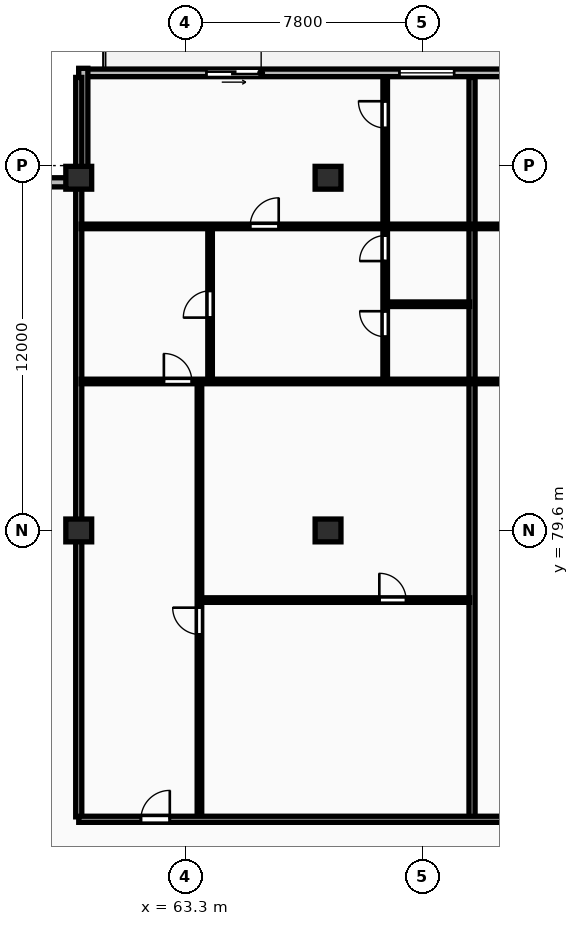
"""IFC4 building model, lengths in metres.
Left out: names, types, materials, properties, quantities, classifications, styles, units other than length and angle.
Written with IfcOpenShell. Run it as: python <this file> out.ifc"""

import sys

from ifc_helpers import new_model, si_unit, direction, frame, frame_2d, origin, origin_2d, place, context, subcontext, project, spatial, rectangle, extrude, element, fill, save


model = new_model("IFC4")
c1 = context("Model", 3, precision=1e-05, world=origin(), true_north=direction((0.0, 1.0)))
c2 = subcontext(c1, "Body", "Model", "MODEL_VIEW")
j1 = project(units=[si_unit("LENGTHUNIT", "METRE"), si_unit("PLANEANGLEUNIT", "RADIAN")], contexts=[c1])
p1 = place(None, origin())
s1 = spatial("IfcSite", under=j1, at=p1, CompositionType="ELEMENT")
p2 = place(p1, origin())
s2 = spatial("IfcBuilding", under=s1, at=p2, CompositionType="ELEMENT")
p3 = place(p2, frame((0.0, 0.0, 207.6)))
s3 = spatial("IfcBuildingStorey", under=s2, at=p3, CompositionType="ELEMENT", Elevation=207.6)
for number, where, z_axis, x_axis in (
    (1, (59.8, 79.6, 0.0), (0.0, 0.0, 1.0), (1.0, 0.0, 0.0)),
    (2, (59.8, 91.2, 0.0), (0.0, 0.0, 1.0), (1.0, 0.0, 0.0)),
    (3, (68.0, 79.6, 0.0), (0.0, 0.0, 1.0), (1.0, 0.0, 0.0)),
    (4, (68.0, 91.2, 0.0), (0.0, 0.0, 1.0), (1.0, 0.0, 0.0)),
):
    element("IfcColumn", number, at=place(p3, frame(where, z_axis=z_axis, x_axis=x_axis)), inside=s3, PredefinedType="COLUMN", context=c2, shape_type="SweptSolid", body=[
        extrude(rectangle(XDim=0.85, YDim=0.75, at=origin_2d()), origin(), (0.0, 0.0, 1.0), 3.25),
    ])
p4 = place(p3, frame((128.4, 94.65, 0.0), z_axis=(0.0, 0.0, 1.0), x_axis=(-1.0, 0.0, 0.0)))
e5 = element("IfcWall", 5, at=p4, inside=s3, PredefinedType="STANDARD", context=c2, shape_type="SweptSolid", body=[
    extrude(rectangle(XDim=68.6, YDim=0.25, at=frame_2d((34.3, 0.0))), origin(), (0.0, 0.0, 1.0), 2.97),
])
p5 = place(p4, frame((62.6, 0.0, 0.0)))
e6 = element("IfcOpeningElement", 6, at=p5, cuts=e5, PredefinedType="OPENING", context=c2, shape_type="SweptSolid", body=[
    extrude(rectangle(XDim=1.8, YDim=2.2, at=frame_2d((0.9, 1.1))), frame((0.0, 0.135, 0.0), z_axis=(0.0, -1.0, 0.0), x_axis=(1.0, 0.0, 0.0)), (0.0, 0.0, 1.0), 0.27),
])
p6 = place(p4, frame((56.252, 0.0, 0.85)))
e7 = element("IfcOpeningElement", 7, at=p6, cuts=e5, PredefinedType="OPENING", context=c2, shape_type="SweptSolid", body=[
    extrude(rectangle(XDim=1.8, YDim=1.8, at=frame_2d((0.9, 0.9))), frame((0.0, 0.135, 0.0), z_axis=(0.0, -1.0, 0.0), x_axis=(1.0, 0.0, 0.0)), (0.0, 0.0, 1.0), 0.27),
])
p7 = place(p4, frame((49.882, 0.0, 0.0)))
e8 = element("IfcOpeningElement", 8, at=p7, cuts=e5, PredefinedType="OPENING", context=c2, shape_type="SweptSolid", body=[
    extrude(rectangle(XDim=1.8, YDim=2.2, at=frame_2d((0.9, 1.1))), frame((0.0, 0.135, 0.0), z_axis=(0.0, -1.0, 0.0), x_axis=(1.0, 0.0, 0.0)), (0.0, 0.0, 1.0), 0.27),
])
p8 = place(p4, frame((43.47, 0.0, 0.85)))
e9 = element("IfcOpeningElement", 9, at=p8, cuts=e5, PredefinedType="OPENING", context=c2, shape_type="SweptSolid", body=[
    extrude(rectangle(XDim=1.8, YDim=1.8, at=frame_2d((0.9, 0.9))), frame((0.0, 0.135, 0.0), z_axis=(0.0, -1.0, 0.0), x_axis=(1.0, 0.0, 0.0)), (0.0, 0.0, 1.0), 0.27),
])
p9 = place(p4, frame((36.75, 0.0, 0.0)))
e10 = element("IfcOpeningElement", 10, at=p9, cuts=e5, PredefinedType="OPENING", context=c2, shape_type="SweptSolid", body=[
    extrude(rectangle(XDim=1.8, YDim=2.2, at=frame_2d((0.9, 1.1))), frame((0.0, 0.135, 0.0), z_axis=(0.0, -1.0, 0.0), x_axis=(1.0, 0.0, 0.0)), (0.0, 0.0, 1.0), 0.27),
])
p10 = place(p4, frame((30.402, 0.0, 0.85)))
e11 = element("IfcOpeningElement", 11, at=p10, cuts=e5, PredefinedType="OPENING", context=c2, shape_type="SweptSolid", body=[
    extrude(rectangle(XDim=1.8, YDim=1.8, at=frame_2d((0.9, 0.9))), frame((0.0, 0.135, 0.0), z_axis=(0.0, -1.0, 0.0), x_axis=(1.0, 0.0, 0.0)), (0.0, 0.0, 1.0), 0.27),
])
p11 = place(p4, frame((23.882, 0.0, 0.0)))
e12 = element("IfcOpeningElement", 12, at=p11, cuts=e5, PredefinedType="OPENING", context=c2, shape_type="SweptSolid", body=[
    extrude(rectangle(XDim=1.8, YDim=2.2, at=frame_2d((0.9, 1.1))), frame((0.0, 0.135, 0.0), z_axis=(0.0, -1.0, 0.0), x_axis=(1.0, 0.0, 0.0)), (0.0, 0.0, 1.0), 0.27),
])
p12 = place(p4, frame((17.47, 0.0, 0.85)))
e13 = element("IfcOpeningElement", 13, at=p12, cuts=e5, PredefinedType="OPENING", context=c2, shape_type="SweptSolid", body=[
    extrude(rectangle(XDim=1.8, YDim=1.8, at=frame_2d((0.9, 0.9))), frame((0.0, 0.135, 0.0), z_axis=(0.0, -1.0, 0.0), x_axis=(1.0, 0.0, 0.0)), (0.0, 0.0, 1.0), 0.27),
])
p13 = place(p4, frame((9.48, 0.0, 0.85)))
e14 = element("IfcOpeningElement", 14, at=p13, cuts=e5, PredefinedType="OPENING", context=c2, shape_type="SweptSolid", body=[
    extrude(rectangle(XDim=1.8, YDim=1.8, at=frame_2d((0.9, 0.9))), frame((0.0, 0.135, 0.0), z_axis=(0.0, -1.0, 0.0), x_axis=(1.0, 0.0, 0.0)), (0.0, 0.0, 1.0), 0.27),
])
p14 = place(p4, frame((5.23, 0.0, 0.85)))
e15 = element("IfcOpeningElement", 15, at=p14, cuts=e5, PredefinedType="OPENING", context=c2, shape_type="SweptSolid", body=[
    extrude(rectangle(XDim=2.4, YDim=1.9, at=frame_2d((1.2, 0.95))), frame((0.0, 0.135, 0.0), z_axis=(0.0, -1.0, 0.0), x_axis=(1.0, 0.0, 0.0)), (0.0, 0.0, 1.0), 0.27),
])
p15 = place(p4, frame((13.455, 0.0, 0.0)))
e16 = element("IfcOpeningElement", 16, at=p15, cuts=e5, PredefinedType="OPENING", context=c2, shape_type="SweptSolid", body=[
    extrude(rectangle(XDim=1.8, YDim=2.2, at=frame_2d((0.9, 1.1))), frame((0.0, 0.135, 0.0), z_axis=(0.0, -1.0, 0.0), x_axis=(1.0, 0.0, 0.0)), (0.0, 0.0, 1.0), 0.27),
])
p16 = place(p4, frame((1.025, 0.0, 0.85)))
e17 = element("IfcOpeningElement", 17, at=p16, cuts=e5, PredefinedType="OPENING", context=c2, shape_type="SweptSolid", body=[
    extrude(rectangle(XDim=2.4, YDim=1.9, at=frame_2d((1.2, 0.95))), frame((0.0, 0.135, 0.0), z_axis=(0.0, -1.0, 0.0), x_axis=(1.0, 0.0, 0.0)), (0.0, 0.0, 1.0), 0.27),
])
for number, where, z_axis, x_axis in (
    (18, (59.95, 94.8, 0.0), (0.0, 0.0, 1.0), (0.0, -1.0, 0.0)),
    (19, (59.8, 91.05, 0.0), (0.0, 0.0, 1.0), (-1.0, 0.0, 0.0)),
):
    element("IfcWall", number, at=place(p3, frame(where, z_axis=z_axis, x_axis=x_axis)), inside=s3, PredefinedType="STANDARD", context=c2, shape_type="SweptSolid", body=[
        extrude(rectangle(XDim=3.6, YDim=0.3, at=frame_2d((1.8, 0.0))), origin(), (0.0, 0.0, 1.0), 2.97),
    ])
p17 = place(p3, frame((59.8, 70.18, 0.0), z_axis=(0.0, 0.0, 1.0), x_axis=(0.0, 1.0, 0.0)))
e20 = element("IfcWall", 20, at=p17, inside=s3, PredefinedType="PARTITIONING", context=c2, shape_type="SweptSolid", body=[
    extrude(rectangle(XDim=24.32, YDim=0.2, at=frame_2d((12.16, 0.0))), origin(), (0.0, 0.0, 1.0), 2.277),
])
p18 = place(p3, frame((72.736, 70.18, 0.0), z_axis=(0.0, 0.0, 1.0), x_axis=(0.0, 1.0, 0.0)))
e21 = element("IfcWall", 21, at=p18, inside=s3, PredefinedType="PARTITIONING", context=c2, shape_type="SweptSolid", body=[
    extrude(rectangle(XDim=24.32, YDim=0.2, at=frame_2d((12.16, 0.0))), origin(), (0.0, 0.0, 1.0), 2.97),
])
p19 = place(p3, frame((63.83, 77.31, 0.0), z_axis=(0.0, 0.0, 1.0), x_axis=(1.0, 0.0, 0.0)))
e22 = element("IfcWall", 22, at=p19, inside=s3, PredefinedType="PARTITIONING", context=c2, shape_type="SweptSolid", body=[
    extrude(rectangle(XDim=8.826, YDim=0.15, at=frame_2d((4.413, 0.0))), origin(), (0.0, 0.0, 1.0), 2.97),
])
p20 = place(p19, frame((5.857, 0.0, 0.0)))
e23 = element("IfcOpeningElement", 23, at=p20, cuts=e22, PredefinedType="OPENING", context=c2, shape_type="SweptSolid", body=[
    extrude(rectangle(XDim=0.88, YDim=2.06, at=frame_2d((0.44, 1.03))), frame((0.0, 0.085, 0.0), z_axis=(0.0, -1.0, 0.0), x_axis=(1.0, 0.0, 0.0)), (0.0, 0.0, 1.0), 0.17),
])
p21 = place(p3, frame((63.77, 70.16, 0.0), z_axis=(0.0, 0.0, 1.0), x_axis=(0.0, 1.0, 0.0)))
e24 = element("IfcWall", 24, at=p21, inside=s3, PredefinedType="PARTITIONING", context=c2, shape_type="SweptSolid", body=[
    extrude(rectangle(XDim=14.3, YDim=0.15, at=frame_2d((7.15, 0.0))), origin(), (0.0, 0.0, 1.0), 2.97),
])
p22 = place(p21, frame((6.02, 0.0, 0.0)))
e25 = element("IfcOpeningElement", 25, at=p22, cuts=e24, PredefinedType="OPENING", context=c2, shape_type="SweptSolid", body=[
    extrude(rectangle(XDim=0.88, YDim=2.06, at=frame_2d((0.44, 1.03))), frame((0.0, 0.085, 0.0), z_axis=(0.0, -1.0, 0.0), x_axis=(1.0, 0.0, 0.0)), (0.0, 0.0, 1.0), 0.17),
])
p23 = place(p3, frame((64.12, 84.54, 0.0), z_axis=(0.0, 0.0, 1.0), x_axis=(0.0, 1.0, 0.0)))
e26 = element("IfcWall", 26, at=p23, inside=s3, PredefinedType="PARTITIONING", context=c2, shape_type="SweptSolid", body=[
    extrude(rectangle(XDim=5.0, YDim=0.15, at=frame_2d((2.5, 0.0))), origin(), (0.0, 0.0, 1.0), 2.97),
])
p24 = place(p23, frame((2.06, 0.0, 0.0)))
e27 = element("IfcOpeningElement", 27, at=p24, cuts=e26, PredefinedType="OPENING", context=c2, shape_type="SweptSolid", body=[
    extrude(rectangle(XDim=0.88, YDim=2.06, at=frame_2d((0.44, 1.03))), frame((0.0, 0.085, 0.0), z_axis=(0.0, -1.0, 0.0), x_axis=(1.0, 0.0, 0.0)), (0.0, 0.0, 1.0), 0.17),
])
p25 = place(p3, frame((69.94, 87.04, 0.0), z_axis=(0.0, 0.0, 1.0), x_axis=(1.0, 0.0, 0.0)))
e28 = element("IfcWall", 28, at=p25, inside=s3, PredefinedType="PARTITIONING", context=c2, shape_type="SweptSolid", body=[
    extrude(rectangle(XDim=2.716, YDim=0.15, at=frame_2d((1.358, 0.0))), origin(), (0.0, 0.0, 1.0), 2.97),
])
p26 = place(p3, frame((69.88, 84.54, 0.0), z_axis=(0.0, 0.0, 1.0), x_axis=(0.0, 1.0, 0.0)))
e29 = element("IfcWall", 29, at=p26, inside=s3, PredefinedType="PARTITIONING", context=c2, shape_type="SweptSolid", body=[
    extrude(rectangle(XDim=9.96, YDim=0.15, at=frame_2d((4.98, 0.0))), origin(), (0.0, 0.0, 1.0), 2.97),
])
p27 = place(p26, frame((1.43, 0.0, 0.0)))
e30 = element("IfcOpeningElement", 30, at=p27, cuts=e29, PredefinedType="OPENING", context=c2, shape_type="SweptSolid", body=[
    extrude(rectangle(XDim=0.84, YDim=2.04, at=frame_2d((0.42, 1.02))), frame((0.0, 0.085, 0.0), z_axis=(0.0, -1.0, 0.0), x_axis=(1.0, 0.0, 0.0)), (0.0, 0.0, 1.0), 0.17),
])
p28 = place(p26, frame((3.92, 0.0, 0.0)))
e31 = element("IfcOpeningElement", 31, at=p28, cuts=e29, PredefinedType="OPENING", context=c2, shape_type="SweptSolid", body=[
    extrude(rectangle(XDim=0.84, YDim=2.04, at=frame_2d((0.42, 1.02))), frame((0.0, 0.085, 0.0), z_axis=(0.0, -1.0, 0.0), x_axis=(1.0, 0.0, 0.0)), (0.0, 0.0, 1.0), 0.17),
])
p29 = place(p26, frame((8.297, 0.0, 0.0)))
e32 = element("IfcOpeningElement", 32, at=p29, cuts=e29, PredefinedType="OPENING", context=c2, shape_type="SweptSolid", body=[
    extrude(rectangle(XDim=0.88, YDim=2.06, at=frame_2d((0.44, 1.03))), frame((0.0, 0.085, 0.0), z_axis=(0.0, -1.0, 0.0), x_axis=(1.0, 0.0, 0.0)), (0.0, 0.0, 1.0), 0.17),
])
p30 = place(p3, frame((59.88, 84.5, 0.0), z_axis=(0.0, 0.0, 1.0), x_axis=(1.0, 0.0, 0.0)))
e33 = element("IfcWall", 33, at=p30, inside=s3, PredefinedType="PARTITIONING", context=c2, shape_type="SweptSolid", body=[
    extrude(rectangle(XDim=12.776, YDim=0.15, at=frame_2d((6.388, 0.0))), origin(), (0.0, 0.0, 1.0), 2.97),
])
p31 = place(p30, frame((2.72, 0.0, 0.0)))
e34 = element("IfcOpeningElement", 34, at=p31, cuts=e33, PredefinedType="OPENING", context=c2, shape_type="SweptSolid", body=[
    extrude(rectangle(XDim=0.92, YDim=2.08, at=frame_2d((0.46, 1.04))), frame((0.0, 0.085, 0.0), z_axis=(0.0, -1.0, 0.0), x_axis=(1.0, 0.0, 0.0)), (0.0, 0.0, 1.0), 0.17),
])
p32 = place(p3, frame((59.88, 89.6, 0.0), z_axis=(0.0, 0.0, 1.0), x_axis=(1.0, 0.0, 0.0)))
e35 = element("IfcWall", 35, at=p32, inside=s3, PredefinedType="PARTITIONING", context=c2, shape_type="SweptSolid", body=[
    extrude(rectangle(XDim=12.776, YDim=0.15, at=frame_2d((6.388, 0.0))), origin(), (0.0, 0.0, 1.0), 2.97),
])
p33 = place(p32, frame((5.557, 0.0, 0.0)))
e36 = element("IfcOpeningElement", 36, at=p33, cuts=e35, PredefinedType="OPENING", context=c2, shape_type="SweptSolid", body=[
    extrude(rectangle(XDim=0.94, YDim=2.1, at=frame_2d((0.47, 1.05))), frame((0.0, 0.085, 0.0), z_axis=(0.0, -1.0, 0.0), x_axis=(1.0, 0.0, 0.0)), (0.0, 0.0, 1.0), 0.17),
])
p34 = place(p3, frame((72.816, 84.5, 0.0), z_axis=(0.0, 0.0, 1.0), x_axis=(1.0, 0.0, 0.0)))
e37 = element("IfcWall", 37, at=p34, inside=s3, PredefinedType="PARTITIONING", context=c2, shape_type="SweptSolid", body=[
    extrude(rectangle(XDim=12.904, YDim=0.15, at=frame_2d((6.452, 0.0))), origin(), (0.0, 0.0, 1.0), 2.97),
])
p35 = place(p34, frame((2.72, 0.0, 0.0)))
e38 = element("IfcOpeningElement", 38, at=p35, cuts=e37, PredefinedType="OPENING", context=c2, shape_type="SweptSolid", body=[
    extrude(rectangle(XDim=0.92, YDim=2.08, at=frame_2d((0.46, 1.04))), frame((0.0, 0.085, 0.0), z_axis=(0.0, -1.0, 0.0), x_axis=(1.0, 0.0, 0.0)), (0.0, 0.0, 1.0), 0.17),
])
p36 = place(p3, frame((72.816, 89.6, 0.0), z_axis=(0.0, 0.0, 1.0), x_axis=(1.0, 0.0, 0.0)))
e39 = element("IfcWall", 39, at=p36, inside=s3, PredefinedType="PARTITIONING", context=c2, shape_type="SweptSolid", body=[
    extrude(rectangle(XDim=12.904, YDim=0.15, at=frame_2d((6.452, 0.0))), origin(), (0.0, 0.0, 1.0), 2.97),
])
p37 = place(p36, frame((5.982, 0.0, 0.0)))
e40 = element("IfcOpeningElement", 40, at=p37, cuts=e39, PredefinedType="OPENING", context=c2, shape_type="SweptSolid", body=[
    extrude(rectangle(XDim=0.94, YDim=2.1, at=frame_2d((0.47, 1.05))), frame((0.0, 0.085, 0.0), z_axis=(0.0, -1.0, 0.0), x_axis=(1.0, 0.0, 0.0)), (0.0, 0.0, 1.0), 0.17),
])
p38 = place(p3, frame((59.8, 70.1, 0.0), z_axis=(0.0, 0.0, 1.0), x_axis=(1.0, 0.0, 0.0)))
e41 = element("IfcWall", 41, at=p38, inside=s3, PredefinedType="PARTITIONING", context=c2, shape_type="SweptSolid", body=[
    extrude(rectangle(XDim=68.6, YDim=0.2, at=frame_2d((34.3, 0.0))), origin(), (0.0, 0.0, 1.0), 2.97),
])
p39 = place(p38, frame((2.045, 0.0, 0.0)))
e42 = element("IfcOpeningElement", 42, at=p39, cuts=e41, PredefinedType="OPENING", context=c2, shape_type="SweptSolid", body=[
    extrude(rectangle(XDim=0.95, YDim=2.15, at=frame_2d((0.475, 1.075))), frame((0.0, 0.11, 0.0), z_axis=(0.0, -1.0, 0.0), x_axis=(1.0, 0.0, 0.0)), (0.0, 0.0, 1.0), 0.22),
])
p40 = place(p38, frame((14.981, 0.0, 0.0)))
e43 = element("IfcOpeningElement", 43, at=p40, cuts=e41, PredefinedType="OPENING", context=c2, shape_type="SweptSolid", body=[
    extrude(rectangle(XDim=0.95, YDim=2.15, at=frame_2d((0.475, 1.075))), frame((0.0, 0.11, 0.0), z_axis=(0.0, -1.0, 0.0), x_axis=(1.0, 0.0, 0.0)), (0.0, 0.0, 1.0), 0.22),
])
p41 = place(p38, frame((28.045, 0.0, 0.0)))
e44 = element("IfcOpeningElement", 44, at=p41, cuts=e41, PredefinedType="OPENING", context=c2, shape_type="SweptSolid", body=[
    extrude(rectangle(XDim=0.95, YDim=2.15, at=frame_2d((0.475, 1.075))), frame((0.0, 0.11, 0.0), z_axis=(0.0, -1.0, 0.0), x_axis=(1.0, 0.0, 0.0)), (0.0, 0.0, 1.0), 0.22),
])
p42 = place(p38, frame((40.981, 0.0, 0.0)))
e45 = element("IfcOpeningElement", 45, at=p42, cuts=e41, PredefinedType="OPENING", context=c2, shape_type="SweptSolid", body=[
    extrude(rectangle(XDim=0.95, YDim=2.15, at=frame_2d((0.475, 1.075))), frame((0.0, 0.11, 0.0), z_axis=(0.0, -1.0, 0.0), x_axis=(1.0, 0.0, 0.0)), (0.0, 0.0, 1.0), 0.22),
])
p43 = place(p38, frame((54.045, 0.0, 0.0)))
e46 = element("IfcOpeningElement", 46, at=p43, cuts=e41, PredefinedType="OPENING", context=c2, shape_type="SweptSolid", body=[
    extrude(rectangle(XDim=0.95, YDim=2.15, at=frame_2d((0.475, 1.075))), frame((0.0, 0.11, 0.0), z_axis=(0.0, -1.0, 0.0), x_axis=(1.0, 0.0, 0.0)), (0.0, 0.0, 1.0), 0.22),
])
p44 = place(p5, origin())
e47 = element("IfcDoor", 47, at=p44, inside=s3, OperationType="SLIDING_TO_LEFT", PredefinedType="DOOR", context=c2, shape_type="SweptSolid", body=[
    extrude(rectangle(XDim=1.8, YDim=2.2, at=frame_2d((0.9, 1.1))), frame((0.0, 0.025, 0.0), z_axis=(0.0, -1.0, 0.0), x_axis=(1.0, 0.0, 0.0)), (0.0, 0.0, 1.0), 0.05),
])
fill(e6, e47)
p45 = place(p6, origin())
e48 = element("IfcWindow", 48, at=p45, inside=s3, PartitioningType="SINGLE_PANEL", PredefinedType="WINDOW", context=c2, shape_type="SweptSolid", body=[
    extrude(rectangle(XDim=1.8, YDim=1.8, at=frame_2d((0.9, 0.9))), frame((0.0, 0.03, 0.0), z_axis=(0.0, -1.0, 0.0), x_axis=(1.0, 0.0, 0.0)), (0.0, 0.0, 1.0), 0.06),
])
fill(e7, e48)
p46 = place(p20, origin())
e49 = element("IfcDoor", 49, at=p46, inside=s3, OperationType="SINGLE_SWING_LEFT", PredefinedType="DOOR", context=c2, shape_type="SweptSolid", body=[
    extrude(rectangle(XDim=0.88, YDim=2.06, at=frame_2d((0.44, 1.03))), frame((0.0, 0.025, 0.0), z_axis=(0.0, -1.0, 0.0), x_axis=(1.0, 0.0, 0.0)), (0.0, 0.0, 1.0), 0.05),
])
fill(e23, e49)
p47 = place(p22, origin())
e50 = element("IfcDoor", 50, at=p47, inside=s3, OperationType="SINGLE_SWING_RIGHT", PredefinedType="DOOR", context=c2, shape_type="SweptSolid", body=[
    extrude(rectangle(XDim=0.88, YDim=2.06, at=frame_2d((0.44, 1.03))), frame((0.0, 0.025, 0.0), z_axis=(0.0, -1.0, 0.0), x_axis=(1.0, 0.0, 0.0)), (0.0, 0.0, 1.0), 0.05),
])
fill(e25, e50)
p48 = place(p24, origin())
e51 = element("IfcDoor", 51, at=p48, inside=s3, OperationType="SINGLE_SWING_LEFT", PredefinedType="DOOR", context=c2, shape_type="SweptSolid", body=[
    extrude(rectangle(XDim=0.88, YDim=2.06, at=frame_2d((0.44, 1.03))), frame((0.0, 0.025, 0.0), z_axis=(0.0, -1.0, 0.0), x_axis=(1.0, 0.0, 0.0)), (0.0, 0.0, 1.0), 0.05),
])
fill(e27, e51)
p49 = place(p27, origin())
e52 = element("IfcDoor", 52, at=p49, inside=s3, OperationType="SINGLE_SWING_RIGHT", PredefinedType="DOOR", context=c2, shape_type="SweptSolid", body=[
    extrude(rectangle(XDim=0.84, YDim=2.04, at=frame_2d((0.42, 1.02))), frame((0.0, 0.025, 0.0), z_axis=(0.0, -1.0, 0.0), x_axis=(1.0, 0.0, 0.0)), (0.0, 0.0, 1.0), 0.05),
])
fill(e30, e52)
p50 = place(p28, origin())
e53 = element("IfcDoor", 53, at=p50, inside=s3, OperationType="SINGLE_SWING_LEFT", PredefinedType="DOOR", context=c2, shape_type="SweptSolid", body=[
    extrude(rectangle(XDim=0.84, YDim=2.04, at=frame_2d((0.42, 1.02))), frame((0.0, 0.025, 0.0), z_axis=(0.0, -1.0, 0.0), x_axis=(1.0, 0.0, 0.0)), (0.0, 0.0, 1.0), 0.05),
])
fill(e31, e53)
p51 = place(p29, origin())
e54 = element("IfcDoor", 54, at=p51, inside=s3, OperationType="SINGLE_SWING_RIGHT", PredefinedType="DOOR", context=c2, shape_type="SweptSolid", body=[
    extrude(rectangle(XDim=0.88, YDim=2.06, at=frame_2d((0.44, 1.03))), frame((0.0, 0.025, 0.0), z_axis=(0.0, -1.0, 0.0), x_axis=(1.0, 0.0, 0.0)), (0.0, 0.0, 1.0), 0.05),
])
fill(e32, e54)
p52 = place(p31, origin())
e55 = element("IfcDoor", 55, at=p52, inside=s3, OperationType="SINGLE_SWING_LEFT", PredefinedType="DOOR", context=c2, shape_type="SweptSolid", body=[
    extrude(rectangle(XDim=0.92, YDim=2.08, at=frame_2d((0.46, 1.04))), frame((0.0, 0.025, 0.0), z_axis=(0.0, -1.0, 0.0), x_axis=(1.0, 0.0, 0.0)), (0.0, 0.0, 1.0), 0.05),
])
fill(e34, e55)
p53 = place(p33, origin())
e56 = element("IfcDoor", 56, at=p53, inside=s3, OperationType="SINGLE_SWING_RIGHT", PredefinedType="DOOR", context=c2, shape_type="SweptSolid", body=[
    extrude(rectangle(XDim=0.94, YDim=2.1, at=frame_2d((0.47, 1.05))), frame((0.0, 0.025, 0.0), z_axis=(0.0, -1.0, 0.0), x_axis=(1.0, 0.0, 0.0)), (0.0, 0.0, 1.0), 0.05),
])
fill(e36, e56)
p54 = place(p39, origin())
e57 = element("IfcDoor", 57, at=p54, inside=s3, OperationType="SINGLE_SWING_RIGHT", PredefinedType="DOOR", context=c2, shape_type="SweptSolid", body=[
    extrude(rectangle(XDim=0.95, YDim=2.15, at=frame_2d((0.475, 1.075))), frame((0.0, 0.025, 0.0), z_axis=(0.0, -1.0, 0.0), x_axis=(1.0, 0.0, 0.0)), (0.0, 0.0, 1.0), 0.05),
])
fill(e42, e57)
save(model, sys.argv[1])
